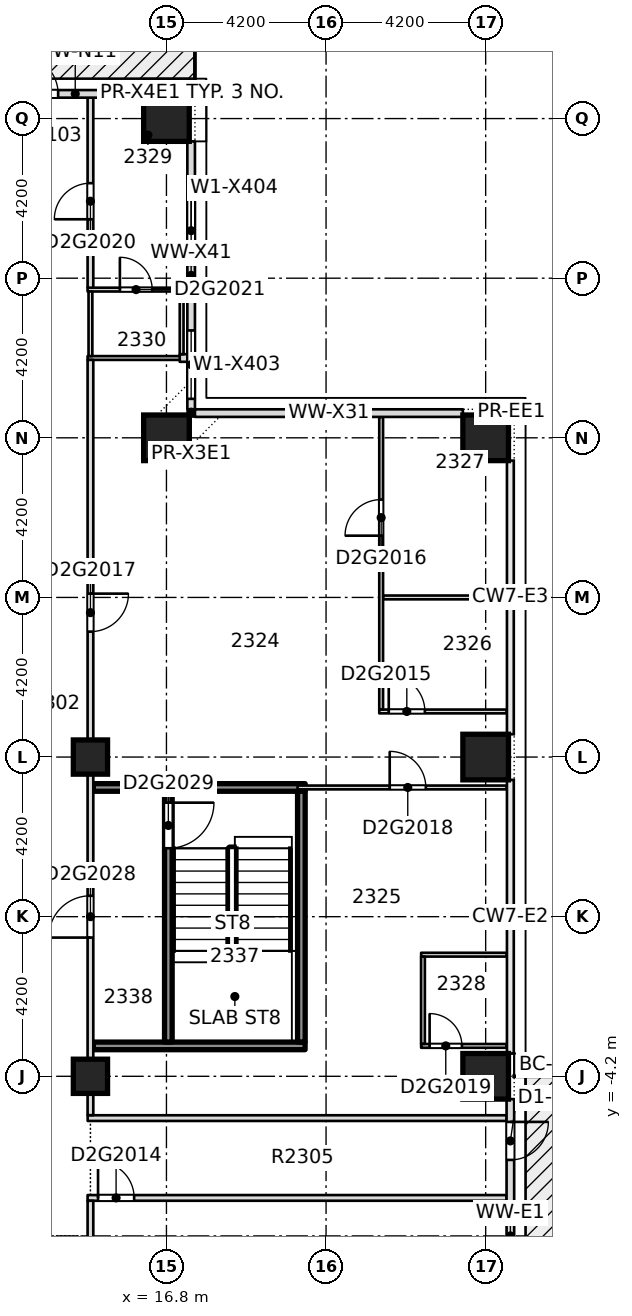
"""IFC4 building model, lengths in metres.
Left out: names, types, materials, properties, quantities, classifications, styles, units other than length and angle.
Written with IfcOpenShell. Run it as: python <this file> out.ifc"""

import sys

from ifc_helpers import new_model, si_unit, direction, frame, frame_2d, origin, origin_2d, place, context, subcontext, project, spatial, rectangle, extrude, element, fill, save


model = new_model("IFC4")
c1 = context("Model", 3, precision=1e-05, world=origin(), true_north=direction((0.0, 1.0)))
c2 = subcontext(c1, "Body", "Model", "MODEL_VIEW")
j1 = project(units=[si_unit("LENGTHUNIT", "METRE"), si_unit("PLANEANGLEUNIT", "RADIAN")], contexts=[c1])
p1 = place(None, origin())
s1 = spatial("IfcSite", under=j1, at=p1, CompositionType="ELEMENT")
p2 = place(p1, origin())
s2 = spatial("IfcBuilding", under=s1, at=p2, CompositionType="ELEMENT")
p3 = place(p2, frame((0.0, 0.0, 94.2)))
s3 = spatial("IfcBuildingStorey", under=s2, at=p3, CompositionType="ELEMENT", Elevation=94.2)
for number, where, z_axis, x_axis in (
    (1, (25.2, -4.2, -0.32), (0.0, 0.0, 1.0), (1.0, 0.0, 0.0)),
    (2, (25.2, 4.2, -0.32), (0.0, 0.0, 1.0), (1.0, 0.0, 0.0)),
    (3, (16.8, 12.6, -0.32), (0.0, 0.0, 1.0), (1.0, 0.0, 0.0)),
    (4, (25.2, 12.6, -0.32), (0.0, 0.0, 1.0), (1.0, 0.0, 0.0)),
    (5, (16.8, 21.0, -0.32), (0.0, 0.0, 1.0), (1.0, 0.0, 0.0)),
):
    element("IfcColumn", number, at=place(p3, frame(where, z_axis=z_axis, x_axis=x_axis)), inside=s3, PredefinedType="COLUMN", context=c2, shape_type="SweptSolid", body=[
        extrude(rectangle(XDim=1.2, YDim=1.2, at=origin_2d()), origin(), (0.0, 0.0, 1.0), 3.45),
    ])
for number, where, z_axis, x_axis in (
    (6, (14.8, -4.2, -0.32), (0.0, 0.0, 1.0), (1.0, 0.0, 0.0)),
    (7, (14.8, 4.2, -0.32), (0.0, 0.0, 1.0), (1.0, 0.0, 0.0)),
):
    element("IfcColumn", number, at=place(p3, frame(where, z_axis=z_axis, x_axis=x_axis)), inside=s3, PredefinedType="COLUMN", context=c2, shape_type="SweptSolid", body=[
        extrude(rectangle(XDim=0.9, YDim=0.9, at=origin_2d()), origin(), (0.0, 0.0, 1.0), 3.45),
    ])
p4 = place(p3, frame((14.725, -7.4, 0.0), z_axis=(0.0, 0.0, 1.0), x_axis=(1.0, 0.0, 0.0)))
e8 = element("IfcWall", 8, at=p4, inside=s3, PredefinedType="PARTITIONING", context=c2, shape_type="SweptSolid", body=[
    extrude(rectangle(XDim=11.025, YDim=0.15, at=frame_2d((5.512, 0.0))), origin(), (0.0, 0.0, 1.0), 3.13),
])
p5 = place(p4, frame((0.275, 0.0, 0.0)))
e9 = element("IfcOpeningElement", 9, at=p5, cuts=e8, PredefinedType="OPENING", context=c2, shape_type="SweptSolid", body=[
    extrude(rectangle(XDim=0.95, YDim=2.1, at=frame_2d((0.475, 1.05))), frame((0.0, 0.085, 0.0), z_axis=(0.0, -1.0, 0.0), x_axis=(1.0, 0.0, 0.0)), (0.0, 0.0, 1.0), 0.17),
])
p6 = place(p3, frame((14.727, -5.3, 0.0), z_axis=(0.0, 0.0, 1.0), x_axis=(1.0, 0.0, 0.0)))
e10 = element("IfcWall", 10, at=p6, inside=s3, PredefinedType="PARTITIONING", context=c2, shape_type="SweptSolid", body=[
    extrude(rectangle(XDim=11.023, YDim=0.15, at=frame_2d((5.511, 0.0))), origin(), (0.0, 0.0, 1.0), 3.13),
])
p7 = place(p3, frame((14.877, -3.4, 0.0), z_axis=(0.0, 0.0, 1.0), x_axis=(1.0, 0.0, 0.0)))
e11 = element("IfcWall", 11, at=p7, inside=s3, PredefinedType="SOLIDWALL", context=c2, shape_type="SweptSolid", body=[
    extrude(rectangle(XDim=5.571, YDim=0.2, at=frame_2d((2.786, 0.0))), origin(), (0.0, 0.0, 1.0), 3.13),
])
p8 = place(p3, frame((23.502, -3.4, 0.0), z_axis=(0.0, 0.0, 1.0), x_axis=(1.0, 0.0, 0.0)))
e12 = element("IfcWall", 12, at=p8, inside=s3, PredefinedType="PARTITIONING", context=c2, shape_type="SweptSolid", body=[
    extrude(rectangle(XDim=2.248, YDim=0.1, at=frame_2d((1.124, 0.0))), origin(), (0.0, 0.0, 1.0), 3.13),
])
p9 = place(p8, frame((0.223, 0.0, 0.0)))
e13 = element("IfcOpeningElement", 13, at=p9, cuts=e12, PredefinedType="OPENING", context=c2, shape_type="SweptSolid", body=[
    extrude(rectangle(XDim=0.85, YDim=2.1, at=frame_2d((0.425, 1.05))), frame((0.0, 0.06, 0.0), z_axis=(0.0, -1.0, 0.0), x_axis=(1.0, 0.0, 0.0)), (0.0, 0.0, 1.0), 0.12),
])
p10 = place(p3, frame((23.502, -1.0, 0.0), z_axis=(0.0, 0.0, 1.0), x_axis=(1.0, 0.0, 0.0)))
e14 = element("IfcWall", 14, at=p10, inside=s3, PredefinedType="PARTITIONING", context=c2, shape_type="SweptSolid", body=[
    extrude(rectangle(XDim=2.248, YDim=0.1, at=frame_2d((1.124, 0.0))), origin(), (0.0, 0.0, 1.0), 3.13),
])
p11 = place(p3, frame((14.875, 3.4, 0.0), z_axis=(0.0, 0.0, 1.0), x_axis=(1.0, 0.0, 0.0)))
e15 = element("IfcWall", 15, at=p11, inside=s3, PredefinedType="SOLIDWALL", context=c2, shape_type="SweptSolid", body=[
    extrude(rectangle(XDim=5.575, YDim=0.2, at=frame_2d((2.788, 0.0))), origin(), (0.0, 0.0, 1.0), 3.13),
])
p12 = place(p3, frame((20.25, 3.4, 0.0), z_axis=(0.0, 0.0, 1.0), x_axis=(1.0, 0.0, 0.0)))
e16 = element("IfcWall", 16, at=p12, inside=s3, PredefinedType="PARTITIONING", context=c2, shape_type="SweptSolid", body=[
    extrude(rectangle(XDim=5.5, YDim=0.1, at=frame_2d((2.75, 0.0))), origin(), (0.0, 0.0, 1.0), 3.13),
])
p13 = place(p12, frame((2.425, 0.0, 0.0)))
e17 = element("IfcOpeningElement", 17, at=p13, cuts=e16, PredefinedType="OPENING", context=c2, shape_type="SweptSolid", body=[
    extrude(rectangle(XDim=0.95, YDim=2.1, at=frame_2d((0.475, 1.05))), frame((0.0, 0.06, 0.0), z_axis=(0.0, -1.0, 0.0), x_axis=(1.0, 0.0, 0.0)), (0.0, 0.0, 1.0), 0.12),
])
p14 = place(p3, frame((22.4, 5.4, 0.0), z_axis=(0.0, 0.0, 1.0), x_axis=(1.0, 0.0, 0.0)))
e18 = element("IfcWall", 18, at=p14, inside=s3, PredefinedType="PARTITIONING", context=c2, shape_type="SweptSolid", body=[
    extrude(rectangle(XDim=3.35, YDim=0.1, at=frame_2d((1.675, 0.0))), origin(), (0.0, 0.0, 1.0), 3.13),
])
p15 = place(p14, frame((0.25, 0.0, 0.0)))
e19 = element("IfcOpeningElement", 19, at=p15, cuts=e18, PredefinedType="OPENING", context=c2, shape_type="SweptSolid", body=[
    extrude(rectangle(XDim=0.95, YDim=2.1, at=frame_2d((0.475, 1.05))), frame((0.0, 0.06, 0.0), z_axis=(0.0, -1.0, 0.0), x_axis=(1.0, 0.0, 0.0)), (0.0, 0.0, 1.0), 0.12),
])
p16 = place(p3, frame((22.5, 8.4, 0.0), z_axis=(0.0, 0.0, 1.0), x_axis=(1.0, 0.0, 0.0)))
e20 = element("IfcWall", 20, at=p16, inside=s3, PredefinedType="PARTITIONING", context=c2, shape_type="SweptSolid", body=[
    extrude(rectangle(XDim=3.25, YDim=0.1, at=frame_2d((1.625, 0.0))), origin(), (0.0, 0.0, 1.0), 3.13),
])
p17 = place(p3, frame((14.725, 14.7, 0.0), z_axis=(0.0, 0.0, 1.0), x_axis=(1.0, 0.0, 0.0)))
e21 = element("IfcWall", 21, at=p17, inside=s3, PredefinedType="PARTITIONING", context=c2, shape_type="SweptSolid", body=[
    extrude(rectangle(XDim=2.525, YDim=0.1, at=frame_2d((1.262, 0.0))), origin(), (0.0, 0.0, 1.0), 3.13),
])
p18 = place(p3, frame((17.15, 14.7, 0.0), z_axis=(0.0, 0.0, 1.0), x_axis=(1.0, 0.0, 0.0)))
e22 = element("IfcWall", 22, at=p18, inside=s3, PredefinedType="PARTITIONING", context=c2, shape_type="SweptSolid", body=[
    extrude(rectangle(XDim=0.2, YDim=0.2, at=frame_2d((0.1, 0.0))), origin(), (0.0, 0.0, 1.0), 3.13),
])
p19 = place(p3, frame((14.725, 16.5, 0.0), z_axis=(0.0, 0.0, 1.0), x_axis=(1.0, 0.0, 0.0)))
e23 = element("IfcWall", 23, at=p19, inside=s3, PredefinedType="PARTITIONING", context=c2, shape_type="SweptSolid", body=[
    extrude(rectangle(XDim=2.525, YDim=0.1, at=frame_2d((1.262, 0.0))), origin(), (0.0, 0.0, 1.0), 3.13),
])
p20 = place(p19, frame((0.85, 0.0, 0.0)))
e24 = element("IfcOpeningElement", 24, at=p20, cuts=e23, PredefinedType="OPENING", context=c2, shape_type="SweptSolid", body=[
    extrude(rectangle(XDim=0.85, YDim=2.1, at=frame_2d((0.425, 1.05))), frame((0.0, 0.06, 0.0), z_axis=(0.0, -1.0, 0.0), x_axis=(1.0, 0.0, 0.0)), (0.0, 0.0, 1.0), 0.12),
])
p21 = place(p3, frame((14.8, -10.6, 0.0), z_axis=(0.0, 0.0, 1.0), x_axis=(0.0, 1.0, 0.0)))
e25 = element("IfcWall", 25, at=p21, inside=s3, PredefinedType="PARTITIONING", context=c2, shape_type="SweptSolid", body=[
    extrude(rectangle(XDim=3.125, YDim=0.15, at=frame_2d((1.562, 0.0))), origin(), (0.0, 0.0, 1.0), 3.13),
])
p22 = place(p3, frame((14.8, -5.223, 0.0), z_axis=(0.0, 0.0, 1.0), x_axis=(0.0, 1.0, 0.0)))
e26 = element("IfcWall", 26, at=p22, inside=s3, PredefinedType="PARTITIONING", context=c2, shape_type="SweptSolid", body=[
    extrude(rectangle(XDim=19.873, YDim=0.15, at=frame_2d((9.937, 0.0))), origin(), (0.0, 0.0, 1.0), 3.13),
])
p23 = place(p22, frame((12.723, 0.0, 0.0)))
e27 = element("IfcOpeningElement", 27, at=p23, cuts=e26, PredefinedType="OPENING", context=c2, shape_type="SweptSolid", body=[
    extrude(rectangle(XDim=1.0, YDim=2.1, at=frame_2d((0.5, 1.05))), frame((0.0, 0.085, 0.0), z_axis=(0.0, -1.0, 0.0), x_axis=(1.0, 0.0, 0.0)), (0.0, 0.0, 1.0), 0.17),
])
p24 = place(p22, frame((4.673, 0.0, 0.0)))
e28 = element("IfcOpeningElement", 28, at=p24, cuts=e26, PredefinedType="OPENING", context=c2, shape_type="SweptSolid", body=[
    extrude(rectangle(XDim=1.1, YDim=2.1, at=frame_2d((0.55, 1.05))), frame((0.0, 0.085, 0.0), z_axis=(0.0, -1.0, 0.0), x_axis=(1.0, 0.0, 0.0)), (0.0, 0.0, 1.0), 0.17),
])
p25 = place(p3, frame((14.8, 14.75, 0.0), z_axis=(0.0, 0.0, 1.0), x_axis=(0.0, 1.0, 0.0)))
e29 = element("IfcWall", 29, at=p25, inside=s3, PredefinedType="PARTITIONING", context=c2, shape_type="SweptSolid", body=[
    extrude(rectangle(XDim=1.7, YDim=0.1, at=frame_2d((0.85, 0.0))), origin(), (0.0, 0.0, 1.0), 3.13),
])
p26 = place(p3, frame((14.8, 16.55, 0.0), z_axis=(0.0, 0.0, 1.0), x_axis=(0.0, 1.0, 0.0)))
e30 = element("IfcWall", 30, at=p26, inside=s3, PredefinedType="PARTITIONING", context=c2, shape_type="SweptSolid", body=[
    extrude(rectangle(XDim=5.0, YDim=0.15, at=frame_2d((2.5, 0.0))), origin(), (0.0, 0.0, 1.0), 3.13),
])
p27 = place(p26, frame((1.8, 0.0, 0.0)))
e31 = element("IfcOpeningElement", 31, at=p27, cuts=e30, PredefinedType="OPENING", context=c2, shape_type="SweptSolid", body=[
    extrude(rectangle(XDim=0.95, YDim=2.1, at=frame_2d((0.475, 1.05))), frame((0.0, 0.085, 0.0), z_axis=(0.0, -1.0, 0.0), x_axis=(1.0, 0.0, 0.0)), (0.0, 0.0, 1.0), 0.17),
])
p28 = place(p3, frame((16.85, -3.3, 0.0), z_axis=(0.0, 0.0, 1.0), x_axis=(0.0, 1.0, 0.0)))
e32 = element("IfcWall", 32, at=p28, inside=s3, PredefinedType="SOLIDWALL", context=c2, shape_type="SweptSolid", body=[
    extrude(rectangle(XDim=6.6, YDim=0.2, at=frame_2d((3.3, 0.0))), origin(), (0.0, 0.0, 1.0), 3.13),
])
p29 = place(p28, frame((5.1, 0.0, 0.0)))
e33 = element("IfcOpeningElement", 33, at=p29, cuts=e32, PredefinedType="OPENING", context=c2, shape_type="SweptSolid", body=[
    extrude(rectangle(XDim=1.2, YDim=2.1, at=frame_2d((0.6, 1.05))), frame((0.0, 0.11, 0.0), z_axis=(0.0, -1.0, 0.0), x_axis=(1.0, 0.0, 0.0)), (0.0, 0.0, 1.0), 0.22),
])
p30 = place(p3, frame((17.2, 14.8, 0.0), z_axis=(0.0, 0.0, 1.0), x_axis=(0.0, 1.0, 0.0)))
e34 = element("IfcWall", 34, at=p30, inside=s3, PredefinedType="PARTITIONING", context=c2, shape_type="SweptSolid", body=[
    extrude(rectangle(XDim=1.65, YDim=0.1, at=frame_2d((0.825, 0.0))), origin(), (0.0, 0.0, 1.0), 3.13),
])
p31 = place(p3, frame((22.45, 5.45, 0.0), z_axis=(0.0, 0.0, 1.0), x_axis=(0.0, 1.0, 0.0)))
e35 = element("IfcWall", 35, at=p31, inside=s3, PredefinedType="PARTITIONING", context=c2, shape_type="SweptSolid", body=[
    extrude(rectangle(XDim=7.7, YDim=0.1, at=frame_2d((3.85, 0.0))), origin(), (0.0, 0.0, 1.0), 3.13),
])
p32 = place(p31, frame((4.575, 0.0, 0.0)))
e36 = element("IfcOpeningElement", 36, at=p32, cuts=e35, PredefinedType="OPENING", context=c2, shape_type="SweptSolid", body=[
    extrude(rectangle(XDim=0.95, YDim=2.1, at=frame_2d((0.475, 1.05))), frame((0.0, 0.06, 0.0), z_axis=(0.0, -1.0, 0.0), x_axis=(1.0, 0.0, 0.0)), (0.0, 0.0, 1.0), 0.12),
])
p33 = place(p3, frame((23.55, -3.348, 0.0), z_axis=(0.0, 0.0, 1.0), x_axis=(0.0, 1.0, 0.0)))
e37 = element("IfcWall", 37, at=p33, inside=s3, PredefinedType="PARTITIONING", context=c2, shape_type="SweptSolid", body=[
    extrude(rectangle(XDim=2.296, YDim=0.1, at=frame_2d((1.148, 0.0))), origin(), (0.0, 0.0, 1.0), 3.13),
])
p34 = place(p3, frame((25.85, -12.0, 0.0), z_axis=(0.0, 0.0, 1.0), x_axis=(0.0, 1.0, 0.0)))
e38 = element("IfcWall", 38, at=p34, inside=s3, PredefinedType="STANDARD", context=c2, shape_type="SweptSolid", body=[
    extrude(rectangle(XDim=7.2, YDim=0.2, at=frame_2d((3.6, 0.0))), origin(), (0.0, 0.0, 1.0), 3.13),
])
p35 = place(p34, frame((0.35, 0.0, 0.2)))
e39 = element("IfcOpeningElement", 39, at=p35, cuts=e38, PredefinedType="OPENING", context=c2, shape_type="SweptSolid", body=[
    extrude(rectangle(XDim=1.8, YDim=2.65, at=frame_2d((0.9, 1.325))), frame((0.0, 0.11, 0.0), z_axis=(0.0, -1.0, 0.0), x_axis=(1.0, 0.0, 0.0)), (0.0, 0.0, 1.0), 0.22),
])
p36 = place(p34, frame((2.25, 0.0, 0.0)))
e40 = element("IfcOpeningElement", 40, at=p36, cuts=e38, PredefinedType="OPENING", context=c2, shape_type="SweptSolid", body=[
    extrude(rectangle(XDim=1.0, YDim=2.4, at=frame_2d((0.5, 1.2))), frame((0.0, 0.11, 0.0), z_axis=(0.0, -1.0, 0.0), x_axis=(1.0, 0.0, 0.0)), (0.0, 0.0, 1.0), 0.22),
])
p37 = place(p34, frame((5.6, 0.0, 0.0)))
e41 = element("IfcOpeningElement", 41, at=p37, cuts=e38, PredefinedType="OPENING", context=c2, shape_type="SweptSolid", body=[
    extrude(rectangle(XDim=1.0, YDim=2.4, at=frame_2d((0.5, 1.2))), frame((0.0, 0.11, 0.0), z_axis=(0.0, -1.0, 0.0), x_axis=(1.0, 0.0, 0.0)), (0.0, 0.0, 1.0), 0.22),
])
p38 = place(p3, frame((24.6, 13.25, 0.0), z_axis=(0.0, 0.0, 1.0), x_axis=(-1.0, 0.0, 0.0)))
e42 = element("IfcWall", 42, at=p38, inside=s3, PredefinedType="STANDARD", context=c2, shape_type="SweptSolid", body=[
    extrude(rectangle(XDim=7.05, YDim=0.2, at=frame_2d((3.525, 0.0))), origin(), (0.0, 0.0, 1.0), 3.13),
])
p39 = place(p3, frame((17.45, 13.35, 0.0), z_axis=(0.0, 0.0, 1.0), x_axis=(0.0, 1.0, 0.0)))
e43 = element("IfcWall", 43, at=p39, inside=s3, PredefinedType="STANDARD", context=c2, shape_type="SweptSolid", body=[
    extrude(rectangle(XDim=7.05, YDim=0.2, at=frame_2d((3.525, 0.0))), origin(), (0.0, 0.0, 1.0), 3.13),
])
p40 = place(p39, frame((0.275, 0.0, 0.2)))
e44 = element("IfcOpeningElement", 44, at=p40, cuts=e43, PredefinedType="OPENING", context=c2, shape_type="SweptSolid", body=[
    extrude(rectangle(XDim=1.8, YDim=2.65, at=frame_2d((0.9, 1.325))), frame((0.0, 0.11, 0.0), z_axis=(0.0, -1.0, 0.0), x_axis=(1.0, 0.0, 0.0)), (0.0, 0.0, 1.0), 0.22),
])
p41 = place(p39, frame((3.8, 0.0, 0.2)))
e45 = element("IfcOpeningElement", 45, at=p41, cuts=e43, PredefinedType="OPENING", context=c2, shape_type="SweptSolid", body=[
    extrude(rectangle(XDim=1.8, YDim=2.65, at=frame_2d((0.9, 1.325))), frame((0.0, 0.11, 0.0), z_axis=(0.0, -1.0, 0.0), x_axis=(1.0, 0.0, 0.0)), (0.0, 0.0, 1.0), 0.22),
])
p42 = place(p3, frame((16.2, 21.65, 0.0), z_axis=(0.0, 0.0, 1.0), x_axis=(-1.0, 0.0, 0.0)))
e46 = element("IfcWall", 46, at=p42, inside=s3, PredefinedType="STANDARD", context=c2, shape_type="SweptSolid", body=[
    extrude(rectangle(XDim=3.6, YDim=0.2, at=frame_2d((1.8, 0.0))), origin(), (0.0, 0.0, 1.0), 3.13),
])
p43 = place(p42, frame((2.25, 0.0, 0.0)))
e47 = element("IfcOpeningElement", 47, at=p43, cuts=e46, PredefinedType="OPENING", context=c2, shape_type="SweptSolid", body=[
    extrude(rectangle(XDim=1.0, YDim=2.4, at=frame_2d((0.5, 1.2))), frame((0.0, 0.11, 0.0), z_axis=(0.0, -1.0, 0.0), x_axis=(1.0, 0.0, 0.0)), (0.0, 0.0, 1.0), 0.22),
])
p44 = place(p3, frame((20.35, -3.298, 0.0), z_axis=(0.0, 0.0, 1.0), x_axis=(0.0, 1.0, 0.0)))
e48 = element("IfcWall", 48, at=p44, inside=s3, PredefinedType="SOLIDWALL", context=c2, shape_type="SweptSolid", body=[
    extrude(rectangle(XDim=6.598, YDim=0.2, at=frame_2d((3.299, 0.0))), origin(), (0.0, 0.0, 1.0), 3.13),
])
p45 = place(p5, origin())
e49 = element("IfcDoor", 49, at=p45, inside=s3, OperationType="SINGLE_SWING_RIGHT", PredefinedType="DOOR", context=c2, shape_type="SweptSolid", body=[
    extrude(rectangle(XDim=0.95, YDim=2.1, at=frame_2d((0.475, 1.05))), frame((0.0, 0.025, 0.0), z_axis=(0.0, -1.0, 0.0), x_axis=(1.0, 0.0, 0.0)), (0.0, 0.0, 1.0), 0.05),
])
fill(e9, e49)
p46 = place(p15, origin())
e50 = element("IfcDoor", 50, at=p46, inside=s3, OperationType="SINGLE_SWING_LEFT", PredefinedType="DOOR", context=c2, shape_type="SweptSolid", body=[
    extrude(rectangle(XDim=0.95, YDim=2.1, at=frame_2d((0.475, 1.05))), frame((0.0, 0.025, 0.0), z_axis=(0.0, -1.0, 0.0), x_axis=(1.0, 0.0, 0.0)), (0.0, 0.0, 1.0), 0.05),
])
fill(e19, e50)
p47 = place(p32, origin())
e51 = element("IfcDoor", 51, at=p47, inside=s3, OperationType="SINGLE_SWING_RIGHT", PredefinedType="DOOR", context=c2, shape_type="SweptSolid", body=[
    extrude(rectangle(XDim=0.95, YDim=2.1, at=frame_2d((0.475, 1.05))), frame((0.0, 0.025, 0.0), z_axis=(0.0, -1.0, 0.0), x_axis=(1.0, 0.0, 0.0)), (0.0, 0.0, 1.0), 0.05),
])
fill(e36, e51)
p48 = place(p23, origin())
e52 = element("IfcDoor", 52, at=p48, inside=s3, OperationType="SINGLE_SWING_LEFT", PredefinedType="DOOR", context=c2, shape_type="SweptSolid", body=[
    extrude(rectangle(XDim=1.0, YDim=2.1, at=frame_2d((0.5, 1.05))), frame((0.0, 0.025, 0.0), z_axis=(0.0, -1.0, 0.0), x_axis=(1.0, 0.0, 0.0)), (0.0, 0.0, 1.0), 0.05),
])
fill(e27, e52)
p49 = place(p13, origin())
e53 = element("IfcDoor", 53, at=p49, inside=s3, OperationType="SINGLE_SWING_LEFT", PredefinedType="DOOR", context=c2, shape_type="SweptSolid", body=[
    extrude(rectangle(XDim=0.95, YDim=2.1, at=frame_2d((0.475, 1.05))), frame((0.0, 0.025, 0.0), z_axis=(0.0, -1.0, 0.0), x_axis=(1.0, 0.0, 0.0)), (0.0, 0.0, 1.0), 0.05),
])
fill(e17, e53)
p50 = place(p9, origin())
e54 = element("IfcDoor", 54, at=p50, inside=s3, OperationType="SINGLE_SWING_LEFT", PredefinedType="DOOR", context=c2, shape_type="SweptSolid", body=[
    extrude(rectangle(XDim=0.85, YDim=2.1, at=frame_2d((0.425, 1.05))), frame((0.0, 0.025, 0.0), z_axis=(0.0, -1.0, 0.0), x_axis=(1.0, 0.0, 0.0)), (0.0, 0.0, 1.0), 0.05),
])
fill(e13, e54)
p51 = place(p27, origin())
e55 = element("IfcDoor", 55, at=p51, inside=s3, OperationType="SINGLE_SWING_LEFT", PredefinedType="DOOR", context=c2, shape_type="SweptSolid", body=[
    extrude(rectangle(XDim=0.95, YDim=2.1, at=frame_2d((0.475, 1.05))), frame((0.0, 0.025, 0.0), z_axis=(0.0, -1.0, 0.0), x_axis=(1.0, 0.0, 0.0)), (0.0, 0.0, 1.0), 0.05),
])
fill(e31, e55)
p52 = place(p20, origin())
e56 = element("IfcDoor", 56, at=p52, inside=s3, OperationType="SINGLE_SWING_RIGHT", PredefinedType="DOOR", context=c2, shape_type="SweptSolid", body=[
    extrude(rectangle(XDim=0.85, YDim=2.1, at=frame_2d((0.425, 1.05))), frame((0.0, 0.025, 0.0), z_axis=(0.0, -1.0, 0.0), x_axis=(1.0, 0.0, 0.0)), (0.0, 0.0, 1.0), 0.05),
])
fill(e24, e56)
p53 = place(p24, origin())
e57 = element("IfcDoor", 57, at=p53, inside=s3, OperationType="SINGLE_SWING_RIGHT", PredefinedType="DOOR", context=c2, shape_type="SweptSolid", body=[
    extrude(rectangle(XDim=1.1, YDim=2.1, at=frame_2d((0.55, 1.05))), frame((0.0, 0.025, 0.0), z_axis=(0.0, -1.0, 0.0), x_axis=(1.0, 0.0, 0.0)), (0.0, 0.0, 1.0), 0.05),
])
fill(e28, e57)
p54 = place(p29, origin())
e58 = element("IfcDoor", 58, at=p54, inside=s3, OperationType="SINGLE_SWING_LEFT", PredefinedType="DOOR", context=c2, shape_type="SweptSolid", body=[
    extrude(rectangle(XDim=1.2, YDim=2.1, at=frame_2d((0.6, 1.05))), frame((0.0, 0.025, 0.0), z_axis=(0.0, -1.0, 0.0), x_axis=(1.0, 0.0, 0.0)), (0.0, 0.0, 1.0), 0.05),
])
fill(e33, e58)
p55 = place(p37, origin())
e59 = element("IfcDoor", 59, at=p55, inside=s3, OperationType="SINGLE_SWING_LEFT", PredefinedType="DOOR", context=c2, shape_type="SweptSolid", body=[
    extrude(rectangle(XDim=1.0, YDim=2.4, at=frame_2d((0.5, 1.2))), frame((0.0, 0.025, 0.0), z_axis=(0.0, -1.0, 0.0), x_axis=(1.0, 0.0, 0.0)), (0.0, 0.0, 1.0), 0.05),
])
fill(e41, e59)
p56 = place(p40, origin())
e60 = element("IfcWindow", 60, at=p56, inside=s3, PartitioningType="SINGLE_PANEL", PredefinedType="WINDOW", context=c2, shape_type="SweptSolid", body=[
    extrude(rectangle(XDim=1.8, YDim=2.65, at=frame_2d((0.9, 1.325))), frame((0.0, 0.03, 0.0), z_axis=(0.0, -1.0, 0.0), x_axis=(1.0, 0.0, 0.0)), (0.0, 0.0, 1.0), 0.06),
])
fill(e44, e60)
p57 = place(p41, origin())
e61 = element("IfcWindow", 61, at=p57, inside=s3, PartitioningType="SINGLE_PANEL", PredefinedType="WINDOW", context=c2, shape_type="SweptSolid", body=[
    extrude(rectangle(XDim=1.8, YDim=2.65, at=frame_2d((0.9, 1.325))), frame((0.0, 0.03, 0.0), z_axis=(0.0, -1.0, 0.0), x_axis=(1.0, 0.0, 0.0)), (0.0, 0.0, 1.0), 0.06),
])
fill(e45, e61)
p58 = place(p43, origin())
e62 = element("IfcDoor", 62, at=p58, inside=s3, OperationType="SINGLE_SWING_LEFT", PredefinedType="DOOR", context=c2, shape_type="SweptSolid", body=[
    extrude(rectangle(XDim=1.0, YDim=2.4, at=frame_2d((0.5, 1.2))), frame((0.0, 0.025, 0.0), z_axis=(0.0, -1.0, 0.0), x_axis=(1.0, 0.0, 0.0)), (0.0, 0.0, 1.0), 0.05),
])
fill(e47, e62)
save(model, sys.argv[1])
